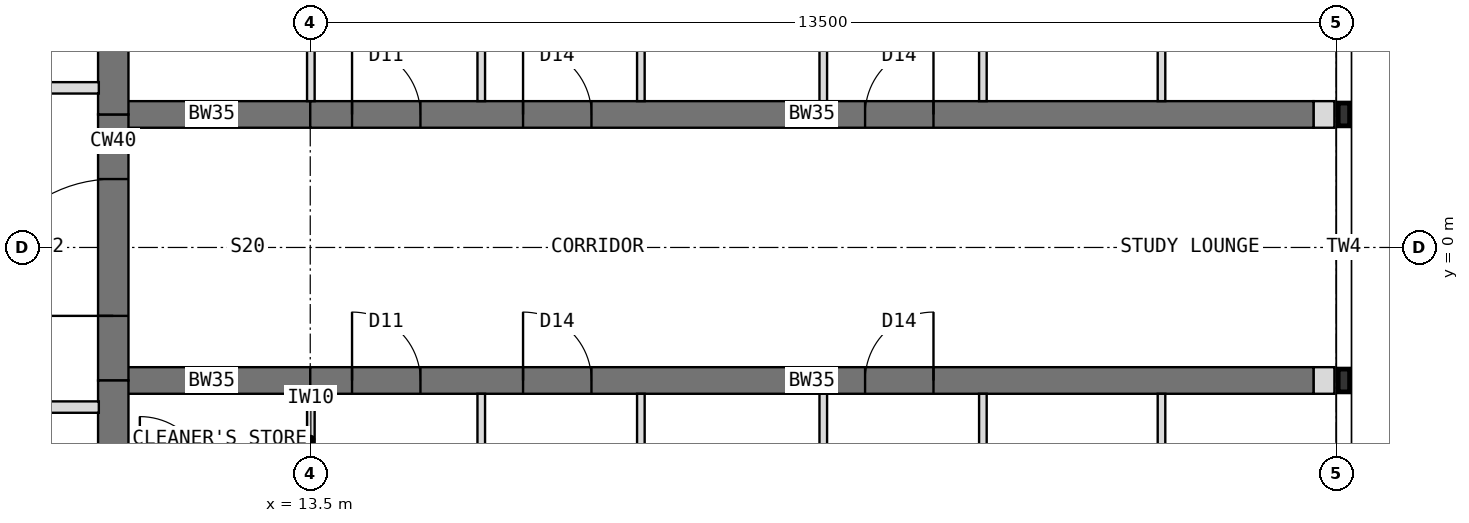
"""IFC4 building model, lengths in metres.
Left out: names, types, materials, properties, quantities, classifications, styles, units other than length and angle.
Written with IfcOpenShell. Run it as: python <this file> out.ifc"""

import sys

from ifc_helpers import new_model, si_unit, direction, frame, frame_2d, origin, place, context, subcontext, project, spatial, rectangle, extrude, element, fill, save


model = new_model("IFC4")
c1 = context("Model", 3, precision=1e-05, world=origin(), true_north=direction((0.0, 1.0)))
c2 = subcontext(c1, "Body", "Model", "MODEL_VIEW")
j1 = project(units=[si_unit("LENGTHUNIT", "METRE"), si_unit("PLANEANGLEUNIT", "RADIAN")], contexts=[c1])
p1 = place(None, origin())
s1 = spatial("IfcSite", under=j1, at=p1, CompositionType="ELEMENT")
p2 = place(p1, origin())
s2 = spatial("IfcBuilding", under=s1, at=p2, CompositionType="ELEMENT")
p3 = place(p2, frame((0.0, 0.0, 287.5)))
s3 = spatial("IfcBuildingStorey", under=s2, at=p3, CompositionType="ELEMENT", Elevation=287.5)
p4 = place(p3, frame((10.908, -6.298, 0.0), z_axis=(0.0, 0.0, 1.0), x_axis=(0.0, 1.0, 0.0)))
e1 = element("IfcWall", 1, at=p4, inside=s3, PredefinedType="SHEAR", context=c2, shape_type="SweptSolid", body=[
    extrude(rectangle(XDim=4.548, YDim=0.4, at=frame_2d((2.274, 0.0))), origin(), (0.0, 0.0, 1.0), 4.0),
])
p5 = place(p3, frame((10.908, -1.75, 0.0), z_axis=(0.0, 0.0, 1.0), x_axis=(0.0, 1.0, 0.0)))
e2 = element("IfcWall", 2, at=p5, inside=s3, PredefinedType="SHEAR", context=c2, shape_type="SweptSolid", body=[
    extrude(rectangle(XDim=3.5, YDim=0.4, at=frame_2d((1.75, 0.0))), origin(), (0.0, 0.0, 1.0), 4.0),
])
p6 = place(p5, frame((0.85, 0.0, 0.0)))
e3 = element("IfcOpeningElement", 3, at=p6, cuts=e2, PredefinedType="OPENING", context=c2, shape_type="SweptSolid", body=[
    extrude(rectangle(XDim=1.8, YDim=2.1, at=frame_2d((0.9, 1.05))), frame((0.0, 0.21, 0.0), z_axis=(0.0, -1.0, 0.0), x_axis=(1.0, 0.0, 0.0)), (0.0, 0.0, 1.0), 0.42),
])
p7 = place(p3, frame((10.908, 1.75, 0.0), z_axis=(0.0, 0.0, 1.0), x_axis=(0.0, 1.0, 0.0)))
e4 = element("IfcWall", 4, at=p7, inside=s3, PredefinedType="SHEAR", context=c2, shape_type="SweptSolid", body=[
    extrude(rectangle(XDim=4.548, YDim=0.4, at=frame_2d((2.274, 0.0))), origin(), (0.0, 0.0, 1.0), 4.0),
])
p8 = place(p3, frame((10.908, 1.75, 0.0), z_axis=(0.0, 0.0, 1.0), x_axis=(1.0, 0.0, 0.0)))
e5 = element("IfcWall", 5, at=p8, inside=s3, PredefinedType="SHEAR", context=c2, shape_type="SweptSolid", body=[
    extrude(rectangle(XDim=2.592, YDim=0.35, at=frame_2d((1.296, 0.0))), origin(), (0.0, 0.0, 1.0), 4.0),
])
p9 = place(p3, frame((13.5, 1.75, 0.0), z_axis=(0.0, 0.0, 1.0), x_axis=(1.0, 0.0, 0.0)))
e6 = element("IfcWall", 6, at=p9, inside=s3, PredefinedType="SHEAR", context=c2, shape_type="SweptSolid", body=[
    extrude(rectangle(XDim=13.2, YDim=0.35, at=frame_2d((6.6, 0.0))), origin(), (0.0, 0.0, 1.0), 4.0),
])
p10 = place(p9, frame((0.55, 0.0, 0.0)))
e7 = element("IfcOpeningElement", 7, at=p10, cuts=e6, PredefinedType="OPENING", context=c2, shape_type="SweptSolid", body=[
    extrude(rectangle(XDim=0.9, YDim=2.1, at=frame_2d((0.45, 1.05))), frame((0.0, 0.185, 0.0), z_axis=(0.0, -1.0, 0.0), x_axis=(1.0, 0.0, 0.0)), (0.0, 0.0, 1.0), 0.37),
])
p11 = place(p9, frame((2.8, 0.0, 0.0)))
e8 = element("IfcOpeningElement", 8, at=p11, cuts=e6, PredefinedType="OPENING", context=c2, shape_type="SweptSolid", body=[
    extrude(rectangle(XDim=0.9, YDim=2.1, at=frame_2d((0.45, 1.05))), frame((0.0, 0.185, 0.0), z_axis=(0.0, -1.0, 0.0), x_axis=(1.0, 0.0, 0.0)), (0.0, 0.0, 1.0), 0.37),
])
p12 = place(p9, frame((7.3, 0.0, 0.0)))
e9 = element("IfcOpeningElement", 9, at=p12, cuts=e6, PredefinedType="OPENING", context=c2, shape_type="SweptSolid", body=[
    extrude(rectangle(XDim=0.9, YDim=2.1, at=frame_2d((0.45, 1.05))), frame((0.0, 0.185, 0.0), z_axis=(0.0, -1.0, 0.0), x_axis=(1.0, 0.0, 0.0)), (0.0, 0.0, 1.0), 0.37),
])
p13 = place(p3, frame((10.908, -1.75, 0.0), z_axis=(0.0, 0.0, 1.0), x_axis=(1.0, 0.0, 0.0)))
e10 = element("IfcWall", 10, at=p13, inside=s3, PredefinedType="SHEAR", context=c2, shape_type="SweptSolid", body=[
    extrude(rectangle(XDim=2.592, YDim=0.35, at=frame_2d((1.296, 0.0))), origin(), (0.0, 0.0, 1.0), 4.0),
])
p14 = place(p3, frame((13.5, -1.75, 0.0), z_axis=(0.0, 0.0, 1.0), x_axis=(1.0, 0.0, 0.0)))
e11 = element("IfcWall", 11, at=p14, inside=s3, PredefinedType="SHEAR", context=c2, shape_type="SweptSolid", body=[
    extrude(rectangle(XDim=13.2, YDim=0.35, at=frame_2d((6.6, 0.0))), origin(), (0.0, 0.0, 1.0), 4.0),
])
p15 = place(p14, frame((0.55, 0.0, 0.0)))
e12 = element("IfcOpeningElement", 12, at=p15, cuts=e11, PredefinedType="OPENING", context=c2, shape_type="SweptSolid", body=[
    extrude(rectangle(XDim=0.9, YDim=2.1, at=frame_2d((0.45, 1.05))), frame((0.0, 0.185, 0.0), z_axis=(0.0, -1.0, 0.0), x_axis=(1.0, 0.0, 0.0)), (0.0, 0.0, 1.0), 0.37),
])
p16 = place(p14, frame((2.8, 0.0, 0.0)))
e13 = element("IfcOpeningElement", 13, at=p16, cuts=e11, PredefinedType="OPENING", context=c2, shape_type="SweptSolid", body=[
    extrude(rectangle(XDim=0.9, YDim=2.1, at=frame_2d((0.45, 1.05))), frame((0.0, 0.185, 0.0), z_axis=(0.0, -1.0, 0.0), x_axis=(1.0, 0.0, 0.0)), (0.0, 0.0, 1.0), 0.37),
])
p17 = place(p14, frame((7.3, 0.0, 0.0)))
e14 = element("IfcOpeningElement", 14, at=p17, cuts=e11, PredefinedType="OPENING", context=c2, shape_type="SweptSolid", body=[
    extrude(rectangle(XDim=0.9, YDim=2.1, at=frame_2d((0.45, 1.05))), frame((0.0, 0.185, 0.0), z_axis=(0.0, -1.0, 0.0), x_axis=(1.0, 0.0, 0.0)), (0.0, 0.0, 1.0), 0.37),
])
for number, where, z_axis, x_axis in (
    (15, (26.7, 1.75, 0.0), (0.0, 0.0, 1.0), (1.0, 0.0, 0.0)),
    (16, (26.7, -1.75, 0.0), (0.0, 0.0, 1.0), (1.0, 0.0, 0.0)),
):
    element("IfcWall", number, at=place(p3, frame(where, z_axis=z_axis, x_axis=x_axis)), inside=s3, PredefinedType="PARTITIONING", context=c2, shape_type="SweptSolid", body=[
        extrude(rectangle(XDim=0.275, YDim=0.35, at=frame_2d((0.138, 0.0))), origin(), (0.0, 0.0, 1.0), 3.7),
    ])
for number, where, z_axis, x_axis in (
    (17, (15.75, 1.925, 0.0), (0.0, 0.0, 1.0), (0.0, 1.0, 0.0)),
    (18, (20.25, 1.925, 0.0), (0.0, 0.0, 1.0), (0.0, 1.0, 0.0)),
):
    element("IfcWall", number, at=place(p3, frame(where, z_axis=z_axis, x_axis=x_axis)), inside=s3, PredefinedType="PARTITIONING", context=c2, shape_type="SweptSolid", body=[
        extrude(rectangle(XDim=4.825, YDim=0.1, at=frame_2d((2.413, 0.0))), origin(), (0.0, 0.0, 1.0), 3.7),
    ])
p18 = place(p3, frame((17.85, 1.925, 0.0), z_axis=(0.0, 0.0, 1.0), x_axis=(0.0, 1.0, 0.0)))
e19 = element("IfcWall", 19, at=p18, inside=s3, PredefinedType="PARTITIONING", context=c2, shape_type="SweptSolid", body=[
    extrude(rectangle(XDim=3.4, YDim=0.1, at=frame_2d((1.7, 0.0))), origin(), (0.0, 0.0, 1.0), 3.7),
])
p19 = place(p18, frame((1.25, 0.0, 0.0)))
e20 = element("IfcOpeningElement", 20, at=p19, cuts=e19, PredefinedType="OPENING", context=c2, shape_type="SweptSolid", body=[
    extrude(rectangle(XDim=0.9, YDim=2.1, at=frame_2d((0.45, 1.05))), frame((0.0, 0.06, 0.0), z_axis=(0.0, -1.0, 0.0), x_axis=(1.0, 0.0, 0.0)), (0.0, 0.0, 1.0), 0.12),
])
p20 = place(p3, frame((22.35, 1.925, 0.0), z_axis=(0.0, 0.0, 1.0), x_axis=(0.0, 1.0, 0.0)))
e21 = element("IfcWall", 21, at=p20, inside=s3, PredefinedType="PARTITIONING", context=c2, shape_type="SweptSolid", body=[
    extrude(rectangle(XDim=3.4, YDim=0.1, at=frame_2d((1.7, 0.0))), origin(), (0.0, 0.0, 1.0), 3.7),
])
p21 = place(p20, frame((1.25, 0.0, 0.0)))
e22 = element("IfcOpeningElement", 22, at=p21, cuts=e21, PredefinedType="OPENING", context=c2, shape_type="SweptSolid", body=[
    extrude(rectangle(XDim=0.9, YDim=2.1, at=frame_2d((0.45, 1.05))), frame((0.0, 0.06, 0.0), z_axis=(0.0, -1.0, 0.0), x_axis=(1.0, 0.0, 0.0)), (0.0, 0.0, 1.0), 0.12),
])
p22 = place(p3, frame((24.7, 1.925, 0.0), z_axis=(0.0, 0.0, 1.0), x_axis=(0.0, 1.0, 0.0)))
e23 = element("IfcWall", 23, at=p22, inside=s3, PredefinedType="PARTITIONING", context=c2, shape_type="SweptSolid", body=[
    extrude(rectangle(XDim=3.4, YDim=0.1, at=frame_2d((1.7, 0.0))), origin(), (0.0, 0.0, 1.0), 3.7),
])
p23 = place(p3, frame((13.508, 1.925, 0.0), z_axis=(0.0, 0.0, 1.0), x_axis=(0.0, 1.0, 0.0)))
e24 = element("IfcWall", 24, at=p23, inside=s3, PredefinedType="PARTITIONING", context=c2, shape_type="SweptSolid", body=[
    extrude(rectangle(XDim=3.2, YDim=0.1, at=frame_2d((1.6, 0.0))), origin(), (0.0, 0.0, 1.0), 3.167),
])
for number, where, z_axis, x_axis in (
    (25, (15.75, -1.925, 0.0), (0.0, 0.0, 1.0), (0.0, -1.0, 0.0)),
    (26, (20.25, -1.925, 0.0), (0.0, 0.0, 1.0), (0.0, -1.0, 0.0)),
):
    element("IfcWall", number, at=place(p3, frame(where, z_axis=z_axis, x_axis=x_axis)), inside=s3, PredefinedType="PARTITIONING", context=c2, shape_type="SweptSolid", body=[
        extrude(rectangle(XDim=4.825, YDim=0.1, at=frame_2d((2.413, 0.0))), origin(), (0.0, 0.0, 1.0), 3.7),
    ])
p24 = place(p3, frame((17.85, -1.925, 0.0), z_axis=(0.0, 0.0, 1.0), x_axis=(0.0, -1.0, 0.0)))
e27 = element("IfcWall", 27, at=p24, inside=s3, PredefinedType="PARTITIONING", context=c2, shape_type="SweptSolid", body=[
    extrude(rectangle(XDim=3.4, YDim=0.1, at=frame_2d((1.7, 0.0))), origin(), (0.0, 0.0, 1.0), 3.7),
])
p25 = place(p24, frame((1.25, 0.0, 0.0)))
e28 = element("IfcOpeningElement", 28, at=p25, cuts=e27, PredefinedType="OPENING", context=c2, shape_type="SweptSolid", body=[
    extrude(rectangle(XDim=0.9, YDim=2.1, at=frame_2d((0.45, 1.05))), frame((0.0, 0.06, 0.0), z_axis=(0.0, -1.0, 0.0), x_axis=(1.0, 0.0, 0.0)), (0.0, 0.0, 1.0), 0.12),
])
p26 = place(p3, frame((22.35, -1.925, 0.0), z_axis=(0.0, 0.0, 1.0), x_axis=(0.0, -1.0, 0.0)))
e29 = element("IfcWall", 29, at=p26, inside=s3, PredefinedType="PARTITIONING", context=c2, shape_type="SweptSolid", body=[
    extrude(rectangle(XDim=3.4, YDim=0.1, at=frame_2d((1.7, 0.0))), origin(), (0.0, 0.0, 1.0), 3.7),
])
p27 = place(p26, frame((1.25, 0.0, 0.0)))
e30 = element("IfcOpeningElement", 30, at=p27, cuts=e29, PredefinedType="OPENING", context=c2, shape_type="SweptSolid", body=[
    extrude(rectangle(XDim=0.9, YDim=2.1, at=frame_2d((0.45, 1.05))), frame((0.0, 0.06, 0.0), z_axis=(0.0, -1.0, 0.0), x_axis=(1.0, 0.0, 0.0)), (0.0, 0.0, 1.0), 0.12),
])
p28 = place(p3, frame((24.7, -1.925, 0.0), z_axis=(0.0, 0.0, 1.0), x_axis=(0.0, -1.0, 0.0)))
e31 = element("IfcWall", 31, at=p28, inside=s3, PredefinedType="PARTITIONING", context=c2, shape_type="SweptSolid", body=[
    extrude(rectangle(XDim=3.4, YDim=0.1, at=frame_2d((1.7, 0.0))), origin(), (0.0, 0.0, 1.0), 3.7),
])
p29 = place(p3, frame((13.508, -1.925, 0.0), z_axis=(0.0, 0.0, 1.0), x_axis=(0.0, -1.0, 0.0)))
e32 = element("IfcWall", 32, at=p29, inside=s3, PredefinedType="PARTITIONING", context=c2, shape_type="SweptSolid", body=[
    extrude(rectangle(XDim=1.2, YDim=0.1, at=frame_2d((0.6, 0.0))), origin(), (0.0, 0.0, 1.0), 3.167),
])
p30 = place(p3, frame((6.143, 2.1, 0.0), z_axis=(0.0, 0.0, 1.0), x_axis=(1.0, 0.0, 0.0)))
e33 = element("IfcWall", 33, at=p30, inside=s3, PredefinedType="PARTITIONING", context=c2, shape_type="SweptSolid", body=[
    extrude(rectangle(XDim=4.576, YDim=0.15, at=frame_2d((2.288, 0.0))), origin(), (0.0, 0.0, 1.0), 3.7),
])
p31 = place(p30, frame((2.703, 0.0, 0.0)))
e34 = element("IfcOpeningElement", 34, at=p31, cuts=e33, PredefinedType="OPENING", context=c2, shape_type="SweptSolid", body=[
    extrude(rectangle(XDim=1.0, YDim=2.1, at=frame_2d((0.5, 1.05))), frame((0.0, 0.085, 0.0), z_axis=(0.0, -1.0, 0.0), x_axis=(1.0, 0.0, 0.0)), (0.0, 0.0, 1.0), 0.17),
])
p32 = place(p3, frame((10.718, -2.1, 0.0), z_axis=(0.0, 0.0, 1.0), x_axis=(-1.0, 0.0, 0.0)))
e35 = element("IfcWall", 35, at=p32, inside=s3, PredefinedType="PARTITIONING", context=c2, shape_type="SweptSolid", body=[
    extrude(rectangle(XDim=4.576, YDim=0.15, at=frame_2d((2.288, 0.0))), origin(), (0.0, 0.0, 1.0), 3.7),
])
p33 = place(p32, frame((0.873, 0.0, 0.0)))
e36 = element("IfcOpeningElement", 36, at=p33, cuts=e35, PredefinedType="OPENING", context=c2, shape_type="SweptSolid", body=[
    extrude(rectangle(XDim=1.0, YDim=2.1, at=frame_2d((0.5, 1.05))), frame((0.0, 0.085, 0.0), z_axis=(0.0, -1.0, 0.0), x_axis=(1.0, 0.0, 0.0)), (0.0, 0.0, 1.0), 0.17),
])
p34 = place(p6, origin())
e37 = element("IfcDoor", 37, at=p34, inside=s3, OperationType="DOUBLE_DOOR_DOUBLE_SWING", PredefinedType="DOOR", context=c2, shape_type="SweptSolid", body=[
    extrude(rectangle(XDim=1.8, YDim=2.1, at=frame_2d((0.9, 1.05))), frame((0.0, 0.025, 0.0), z_axis=(0.0, -1.0, 0.0), x_axis=(1.0, 0.0, 0.0)), (0.0, 0.0, 1.0), 0.05),
])
fill(e3, e37)
p35 = place(p10, origin())
e38 = element("IfcDoor", 38, at=p35, inside=s3, OperationType="SINGLE_SWING_LEFT", PredefinedType="DOOR", context=c2, shape_type="SweptSolid", body=[
    extrude(rectangle(XDim=0.9, YDim=2.1, at=frame_2d((0.45, 1.05))), frame((0.0, 0.025, 0.0), z_axis=(0.0, -1.0, 0.0), x_axis=(1.0, 0.0, 0.0)), (0.0, 0.0, 1.0), 0.05),
])
fill(e7, e38)
p36 = place(p11, origin())
e39 = element("IfcDoor", 39, at=p36, inside=s3, OperationType="SINGLE_SWING_LEFT", PredefinedType="DOOR", context=c2, shape_type="SweptSolid", body=[
    extrude(rectangle(XDim=0.9, YDim=2.1, at=frame_2d((0.45, 1.05))), frame((0.0, 0.025, 0.0), z_axis=(0.0, -1.0, 0.0), x_axis=(1.0, 0.0, 0.0)), (0.0, 0.0, 1.0), 0.05),
])
fill(e8, e39)
p37 = place(p12, origin())
e40 = element("IfcDoor", 40, at=p37, inside=s3, OperationType="SINGLE_SWING_RIGHT", PredefinedType="DOOR", context=c2, shape_type="SweptSolid", body=[
    extrude(rectangle(XDim=0.9, YDim=2.1, at=frame_2d((0.45, 1.05))), frame((0.0, 0.025, 0.0), z_axis=(0.0, -1.0, 0.0), x_axis=(1.0, 0.0, 0.0)), (0.0, 0.0, 1.0), 0.05),
])
fill(e9, e40)
p38 = place(p15, origin())
e41 = element("IfcDoor", 41, at=p38, inside=s3, OperationType="SINGLE_SWING_LEFT", PredefinedType="DOOR", context=c2, shape_type="SweptSolid", body=[
    extrude(rectangle(XDim=0.9, YDim=2.1, at=frame_2d((0.45, 1.05))), frame((0.0, 0.025, 0.0), z_axis=(0.0, -1.0, 0.0), x_axis=(1.0, 0.0, 0.0)), (0.0, 0.0, 1.0), 0.05),
])
fill(e12, e41)
p39 = place(p16, origin())
e42 = element("IfcDoor", 42, at=p39, inside=s3, OperationType="SINGLE_SWING_LEFT", PredefinedType="DOOR", context=c2, shape_type="SweptSolid", body=[
    extrude(rectangle(XDim=0.9, YDim=2.1, at=frame_2d((0.45, 1.05))), frame((0.0, 0.025, 0.0), z_axis=(0.0, -1.0, 0.0), x_axis=(1.0, 0.0, 0.0)), (0.0, 0.0, 1.0), 0.05),
])
fill(e13, e42)
p40 = place(p17, origin())
e43 = element("IfcDoor", 43, at=p40, inside=s3, OperationType="SINGLE_SWING_RIGHT", PredefinedType="DOOR", context=c2, shape_type="SweptSolid", body=[
    extrude(rectangle(XDim=0.9, YDim=2.1, at=frame_2d((0.45, 1.05))), frame((0.0, 0.025, 0.0), z_axis=(0.0, -1.0, 0.0), x_axis=(1.0, 0.0, 0.0)), (0.0, 0.0, 1.0), 0.05),
])
fill(e14, e43)
save(model, sys.argv[1])
